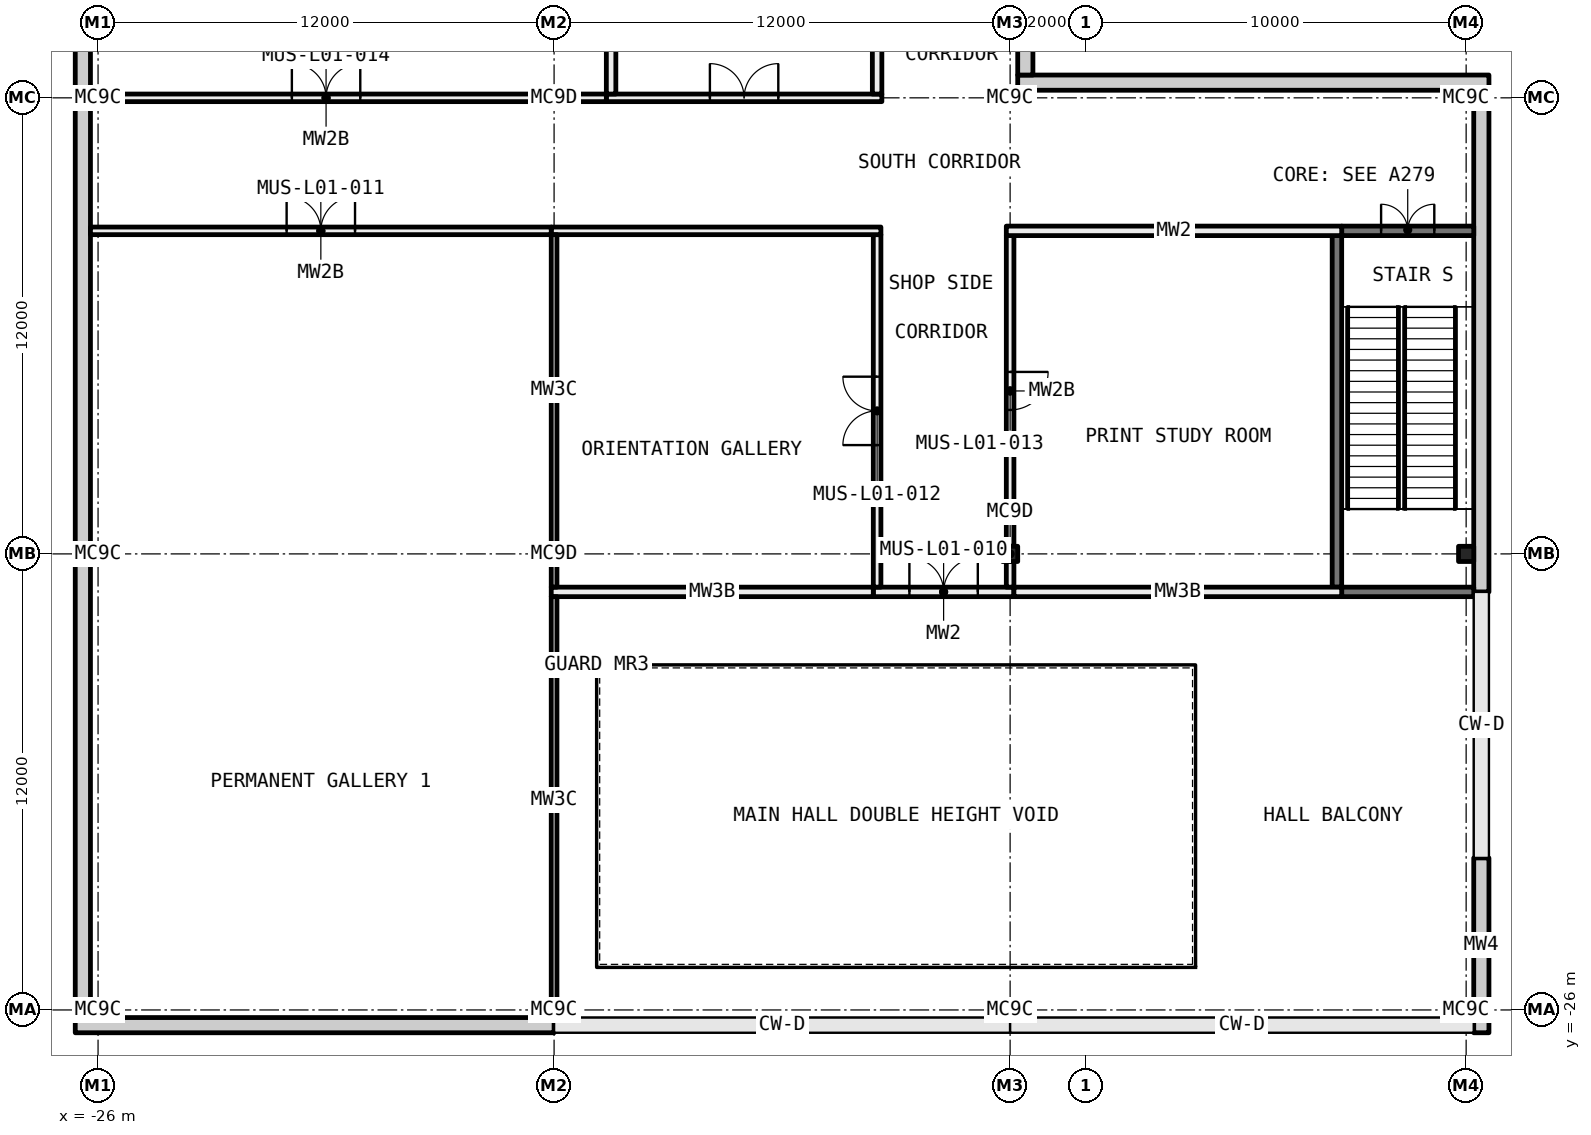
"""IFC4 building model, lengths in metres.
Left out: names, types, materials, properties, quantities, classifications, styles, units other than length and angle.
Written with IfcOpenShell. Run it as: python <this file> out.ifc"""

import sys

from ifc_helpers import new_model, si_unit, direction, frame, frame_2d, origin, origin_2d, place, context, subcontext, project, spatial, rectangle, i_section, extrude, element, fill, save


model = new_model("IFC4")
c1 = context("Model", 3, precision=1e-05, world=origin(), true_north=direction((0.0, 1.0)))
c2 = subcontext(c1, "Body", "Model", "MODEL_VIEW")
j1 = project(units=[si_unit("LENGTHUNIT", "METRE"), si_unit("PLANEANGLEUNIT", "RADIAN")], contexts=[c1])
p1 = place(None, origin())
s1 = spatial("IfcSite", under=j1, at=p1, CompositionType="ELEMENT")
p2 = place(p1, origin())
s2 = spatial("IfcBuilding", under=s1, at=p2, CompositionType="ELEMENT")
p3 = place(p2, frame((0.0, 0.0, 6.0)))
s3 = spatial("IfcBuildingStorey", under=s2, at=p3, CompositionType="ELEMENT", Elevation=6.0)
for number, where, z_axis, x_axis in (
    (1, (-26.0, -26.0, 0.0), (0.0, 0.0, 1.0), (1.0, 0.0, 0.0)),
    (2, (-26.0, -14.0, 0.0), (0.0, 0.0, 1.0), (1.0, 0.0, 0.0)),
    (3, (-26.0, -2.0, 0.0), (0.0, 0.0, 1.0), (1.0, 0.0, 0.0)),
    (4, (-14.0, -26.0, 0.0), (0.0, 0.0, 1.0), (1.0, 0.0, 0.0)),
    (5, (-14.0, -14.0, 0.0), (0.0, 0.0, 1.0), (1.0, 0.0, 0.0)),
    (6, (-14.0, -2.0, 0.0), (0.0, 0.0, 1.0), (1.0, 0.0, 0.0)),
    (7, (-2.0, -26.0, 0.0), (0.0, 0.0, 1.0), (1.0, 0.0, 0.0)),
    (8, (-2.0, -14.0, 0.0), (0.0, 0.0, 1.0), (1.0, 0.0, 0.0)),
    (9, (-2.0, -2.0, 0.0), (0.0, 0.0, 1.0), (1.0, 0.0, 0.0)),
    (10, (10.0, -26.0, 0.0), (0.0, 0.0, 1.0), (1.0, 0.0, 0.0)),
    (11, (10.0, -14.0, 0.0), (0.0, 0.0, 1.0), (1.0, 0.0, 0.0)),
    (12, (10.0, -2.0, 0.0), (0.0, 0.0, 1.0), (1.0, 0.0, 0.0)),
):
    element("IfcColumn", number, at=place(p3, frame(where, z_axis=z_axis, x_axis=x_axis)), inside=s3, PredefinedType="COLUMN", context=c2, shape_type="SweptSolid", body=[
        extrude(i_section(OverallWidth=0.4, OverallDepth=0.4, WebThickness=0.013, FlangeThickness=0.021, FilletRadius=0.022, at=origin_2d()), origin(), (0.0, 0.0, 1.0), 5.6),
    ])
p4 = place(p3, frame((-5.6, -15.0, 0.0), z_axis=(0.0, 0.0, 1.0), x_axis=(1.0, 0.0, 0.0)))
e13 = element("IfcWall", 13, at=p4, inside=s3, PredefinedType="PARTITIONING", context=c2, shape_type="SweptSolid", body=[
    extrude(rectangle(XDim=3.7, YDim=0.25, at=frame_2d((1.85, 0.0))), origin(), (0.0, 0.0, 1.0), 5.6),
])
p5 = place(p4, frame((0.95, 0.0, 0.0)))
e14 = element("IfcOpeningElement", 14, at=p5, cuts=e13, PredefinedType="OPENING", context=c2, shape_type="SweptSolid", body=[
    extrude(rectangle(XDim=1.8, YDim=2.1, at=frame_2d((0.9, 1.05))), frame((0.0, 0.135, 0.0), z_axis=(0.0, -1.0, 0.0), x_axis=(1.0, 0.0, 0.0)), (0.0, 0.0, 1.0), 0.27),
])
p6 = place(p3, frame((-12.625, -2.0, 0.0), z_axis=(0.0, 0.0, 1.0), x_axis=(1.0, 0.0, 0.0)))
e15 = element("IfcWall", 15, at=p6, inside=s3, PredefinedType="PARTITIONING", context=c2, shape_type="SweptSolid", body=[
    extrude(rectangle(XDim=7.25, YDim=0.2, at=frame_2d((3.625, 0.0))), origin(), (0.0, 0.0, 1.0), 5.012),
])
p7 = place(p6, frame((2.725, 0.0, 0.0)))
e16 = element("IfcOpeningElement", 16, at=p7, cuts=e15, PredefinedType="OPENING", context=c2, shape_type="SweptSolid", body=[
    extrude(rectangle(XDim=1.8, YDim=2.1, at=frame_2d((0.9, 1.05))), frame((0.0, 0.11, 0.0), z_axis=(0.0, -1.0, 0.0), x_axis=(1.0, 0.0, 0.0)), (0.0, 0.0, 1.0), 0.22),
])
p8 = place(p3, frame((-5.5, -1.9, 0.0), z_axis=(0.0, 0.0, 1.0), x_axis=(0.0, 1.0, 0.0)))
e17 = element("IfcWall", 17, at=p8, inside=s3, PredefinedType="PARTITIONING", context=c2, shape_type="SweptSolid", body=[
    extrude(rectangle(XDim=2.975, YDim=0.25, at=frame_2d((1.487, 0.0))), origin(), (0.0, 0.0, 1.0), 5.6),
])
p9 = place(p3, frame((-5.5, -14.875, 0.0), z_axis=(0.0, 0.0, 1.0), x_axis=(0.0, 1.0, 0.0)))
e18 = element("IfcWall", 18, at=p9, inside=s3, PredefinedType="PARTITIONING", context=c2, shape_type="SweptSolid", body=[
    extrude(rectangle(XDim=9.275, YDim=0.2, at=frame_2d((4.637, 0.0))), origin(), (0.0, 0.0, 1.0), 5.6),
])
p10 = place(p9, frame((3.738, 0.0, 0.0)))
e19 = element("IfcOpeningElement", 19, at=p10, cuts=e18, PredefinedType="OPENING", context=c2, shape_type="SweptSolid", body=[
    extrude(rectangle(XDim=1.8, YDim=2.1, at=frame_2d((0.9, 1.05))), frame((0.0, 0.11, 0.0), z_axis=(0.0, -1.0, 0.0), x_axis=(1.0, 0.0, 0.0)), (0.0, 0.0, 1.0), 0.22),
])
p11 = place(p3, frame((-14.075, -5.5, 0.0), z_axis=(0.0, 0.0, 1.0), x_axis=(1.0, 0.0, 0.0)))
e20 = element("IfcWall", 20, at=p11, inside=s3, PredefinedType="PARTITIONING", context=c2, shape_type="SweptSolid", body=[
    extrude(rectangle(XDim=8.675, YDim=0.2, at=frame_2d((4.337, 0.0))), origin(), (0.0, 0.0, 1.0), 5.6),
])
p12 = place(p3, frame((-26.2, -5.5, 0.0), z_axis=(0.0, 0.0, 1.0), x_axis=(1.0, 0.0, 0.0)))
e21 = element("IfcWall", 21, at=p12, inside=s3, PredefinedType="PARTITIONING", context=c2, shape_type="SweptSolid", body=[
    extrude(rectangle(XDim=12.125, YDim=0.2, at=frame_2d((6.062, 0.0))), origin(), (0.0, 0.0, 1.0), 5.6),
])
p13 = place(p12, frame((5.162, 0.0, 0.0)))
e22 = element("IfcOpeningElement", 22, at=p13, cuts=e21, PredefinedType="OPENING", context=c2, shape_type="SweptSolid", body=[
    extrude(rectangle(XDim=1.8, YDim=2.1, at=frame_2d((0.9, 1.05))), frame((0.0, 0.11, 0.0), z_axis=(0.0, -1.0, 0.0), x_axis=(1.0, 0.0, 0.0)), (0.0, 0.0, 1.0), 0.22),
])
p14 = place(p3, frame((-25.8, -2.0, 0.0), z_axis=(0.0, 0.0, 1.0), x_axis=(1.0, 0.0, 0.0)))
e23 = element("IfcWall", 23, at=p14, inside=s3, PredefinedType="PARTITIONING", context=c2, shape_type="SweptSolid", body=[
    extrude(rectangle(XDim=11.6, YDim=0.2, at=frame_2d((5.8, 0.0))), origin(), (0.0, 0.0, 1.0), 5.012),
])
p15 = place(p14, frame((4.9, 0.0, 0.0)))
e24 = element("IfcOpeningElement", 24, at=p15, cuts=e23, PredefinedType="OPENING", context=c2, shape_type="SweptSolid", body=[
    extrude(rectangle(XDim=1.8, YDim=2.1, at=frame_2d((0.9, 1.05))), frame((0.0, 0.11, 0.0), z_axis=(0.0, -1.0, 0.0), x_axis=(1.0, 0.0, 0.0)), (0.0, 0.0, 1.0), 0.22),
])
p16 = place(p3, frame((-13.8, -2.0, 0.0), z_axis=(0.0, 0.0, 1.0), x_axis=(1.0, 0.0, 0.0)))
e25 = element("IfcWall", 25, at=p16, inside=s3, PredefinedType="PARTITIONING", context=c2, shape_type="SweptSolid", body=[
    extrude(rectangle(XDim=1.175, YDim=0.2, at=frame_2d((0.587, 0.0))), origin(), (0.0, 0.0, 1.0), 5.012),
])
p17 = place(p3, frame((-2.0, -14.875, 0.0), z_axis=(0.0, 0.0, 1.0), x_axis=(0.0, 1.0, 0.0)))
e26 = element("IfcWall", 26, at=p17, inside=s3, PredefinedType="PARTITIONING", context=c2, shape_type="SweptSolid", body=[
    extrude(rectangle(XDim=0.675, YDim=0.2, at=frame_2d((0.337, 0.0))), origin(), (0.0, 0.0, 1.0), 5.012),
])
p18 = place(p3, frame((-2.0, -13.8, 0.0), z_axis=(0.0, 0.0, 1.0), x_axis=(0.0, 1.0, 0.0)))
e27 = element("IfcWall", 27, at=p18, inside=s3, PredefinedType="PARTITIONING", context=c2, shape_type="SweptSolid", body=[
    extrude(rectangle(XDim=8.175, YDim=0.2, at=frame_2d((4.087, 0.0))), origin(), (0.0, 0.0, 1.0), 5.012),
])
p19 = place(p18, frame((3.588, 0.0, 0.0)))
e28 = element("IfcOpeningElement", 28, at=p19, cuts=e27, PredefinedType="OPENING", context=c2, shape_type="SweptSolid", body=[
    extrude(rectangle(XDim=1.0, YDim=2.1, at=frame_2d((0.5, 1.05))), frame((0.0, 0.11, 0.0), z_axis=(0.0, -1.0, 0.0), x_axis=(1.0, 0.0, 0.0)), (0.0, 0.0, 1.0), 0.22),
])
p20 = place(p3, frame((-2.1, -5.5, 0.0), z_axis=(0.0, 0.0, 1.0), x_axis=(1.0, 0.0, 0.0)))
e29 = element("IfcWall", 29, at=p20, inside=s3, PredefinedType="PARTITIONING", context=c2, shape_type="SweptSolid", body=[
    extrude(rectangle(XDim=8.825, YDim=0.25, at=frame_2d((4.413, 0.0))), origin(), (0.0, 0.0, 1.0), 5.6),
])
p21 = place(p3, frame((6.725, -5.5, 0.0), z_axis=(0.0, 0.0, 1.0), x_axis=(1.0, 0.0, 0.0)))
e30 = element("IfcWall", 30, at=p21, inside=s3, PredefinedType="SHEAR", context=c2, shape_type="SweptSolid", body=[
    extrude(rectangle(XDim=3.475, YDim=0.25, at=frame_2d((1.737, 0.0))), origin(), (0.0, 0.0, 1.0), 5.6),
])
p22 = place(p21, frame((1.037, 0.0, 0.0)))
e31 = element("IfcOpeningElement", 31, at=p22, cuts=e30, PredefinedType="OPENING", context=c2, shape_type="SweptSolid", body=[
    extrude(rectangle(XDim=1.4, YDim=2.1, at=frame_2d((0.7, 1.05))), frame((0.0, 0.135, 0.0), z_axis=(0.0, -1.0, 0.0), x_axis=(1.0, 0.0, 0.0)), (0.0, 0.0, 1.0), 0.27),
])
p23 = place(p3, frame((-14.075, -15.0, 0.0), z_axis=(0.0, 0.0, 1.0), x_axis=(1.0, 0.0, 0.0)))
e32 = element("IfcWall", 32, at=p23, inside=s3, PredefinedType="PARTITIONING", context=c2, shape_type="SweptSolid", body=[
    extrude(rectangle(XDim=8.475, YDim=0.25, at=frame_2d((4.237, 0.0))), origin(), (0.0, 0.0, 1.0), 5.6),
])
p24 = place(p3, frame((-14.0, -25.8, 0.0), z_axis=(0.0, 0.0, 1.0), x_axis=(0.0, 1.0, 0.0)))
e33 = element("IfcWall", 33, at=p24, inside=s3, PredefinedType="PARTITIONING", context=c2, shape_type="SweptSolid", body=[
    extrude(rectangle(XDim=10.675, YDim=0.15, at=frame_2d((5.337, 0.0))), origin(), (0.0, 0.0, 1.0), 5.012),
])
p25 = place(p3, frame((-1.9, -15.0, 0.0), z_axis=(0.0, 0.0, 1.0), x_axis=(1.0, 0.0, 0.0)))
e34 = element("IfcWall", 34, at=p25, inside=s3, PredefinedType="PARTITIONING", context=c2, shape_type="SweptSolid", body=[
    extrude(rectangle(XDim=8.625, YDim=0.25, at=frame_2d((4.312, 0.0))), origin(), (0.0, 0.0, 1.0), 5.6),
])
p26 = place(p3, frame((-12.5, -1.9, 0.0), z_axis=(0.0, 0.0, 1.0), x_axis=(0.0, 1.0, 0.0)))
e35 = element("IfcWall", 35, at=p26, inside=s3, PredefinedType="PARTITIONING", context=c2, shape_type="SweptSolid", body=[
    extrude(rectangle(XDim=2.975, YDim=0.25, at=frame_2d((1.487, 0.0))), origin(), (0.0, 0.0, 1.0), 5.6),
])
p27 = place(p3, frame((-14.0, -14.875, 0.0), z_axis=(0.0, 0.0, 1.0), x_axis=(0.0, 1.0, 0.0)))
e36 = element("IfcWall", 36, at=p27, inside=s3, PredefinedType="PARTITIONING", context=c2, shape_type="SweptSolid", body=[
    extrude(rectangle(XDim=0.675, YDim=0.15, at=frame_2d((0.337, 0.0))), origin(), (0.0, 0.0, 1.0), 5.012),
])
p28 = place(p3, frame((-14.0, -13.8, 0.0), z_axis=(0.0, 0.0, 1.0), x_axis=(0.0, 1.0, 0.0)))
e37 = element("IfcWall", 37, at=p28, inside=s3, PredefinedType="PARTITIONING", context=c2, shape_type="SweptSolid", body=[
    extrude(rectangle(XDim=8.2, YDim=0.15, at=frame_2d((4.1, 0.0))), origin(), (0.0, 0.0, 1.0), 5.012),
])
p29 = place(p3, frame((6.725, -15.0, 0.0), z_axis=(0.0, 0.0, 1.0), x_axis=(1.0, 0.0, 0.0)))
e38 = element("IfcWall", 38, at=p29, inside=s3, PredefinedType="SHEAR", context=c2, shape_type="SweptSolid", body=[
    extrude(rectangle(XDim=3.475, YDim=0.25, at=frame_2d((1.737, 0.0))), origin(), (0.0, 0.0, 1.0), 5.6),
])
p30 = place(p3, frame((6.6, -14.875, 0.0), z_axis=(0.0, 0.0, 1.0), x_axis=(0.0, 1.0, 0.0)))
e39 = element("IfcWall", 39, at=p30, inside=s3, PredefinedType="SHEAR", context=c2, shape_type="SweptSolid", body=[
    extrude(rectangle(XDim=9.25, YDim=0.25, at=frame_2d((4.625, 0.0))), origin(), (0.0, 0.0, 1.0), 5.6),
])
p31 = place(p3, frame((-26.6, -26.4, -0.4), z_axis=(0.0, 0.0, 1.0), x_axis=(1.0, 0.0, 0.0)))
e40 = element("IfcWall", 40, at=p31, inside=s3, PredefinedType="STANDARD", context=c2, shape_type="SweptSolid", body=[
    extrude(rectangle(XDim=12.6, YDim=0.4, at=frame_2d((6.3, 0.0))), origin(), (0.0, 0.0, 1.0), 6.0),
])
p32 = place(p3, frame((10.4, -26.6, -0.4), z_axis=(0.0, 0.0, 1.0), x_axis=(0.0, 1.0, 0.0)))
e41 = element("IfcWall", 41, at=p32, inside=s3, PredefinedType="STANDARD", context=c2, shape_type="SweptSolid", body=[
    extrude(rectangle(XDim=4.6, YDim=0.4, at=frame_2d((2.3, 0.0))), origin(), (0.0, 0.0, 1.0), 6.0),
])
p33 = place(p3, frame((-26.4, -26.2, -0.4), z_axis=(0.0, 0.0, 1.0), x_axis=(0.0, 1.0, 0.0)))
e42 = element("IfcWall", 42, at=p33, inside=s3, PredefinedType="STANDARD", context=c2, shape_type="SweptSolid", body=[
    extrude(rectangle(XDim=72.4, YDim=0.4, at=frame_2d((36.2, 0.0))), origin(), (0.0, 0.0, 1.0), 6.0),
])
p34 = place(p3, frame((10.4, -15.0, -0.4), z_axis=(0.0, 0.0, 1.0), x_axis=(0.0, 1.0, 0.0)))
e43 = element("IfcWall", 43, at=p34, inside=s3, PredefinedType="STANDARD", context=c2, shape_type="SweptSolid", body=[
    extrude(rectangle(XDim=13.2, YDim=0.4, at=frame_2d((6.6, 0.0))), origin(), (0.0, 0.0, 1.0), 6.0),
])
p35 = place(p3, frame((-1.8, -1.6, -0.4), z_axis=(0.0, 0.0, 1.0), x_axis=(1.0, 0.0, 0.0)))
e44 = element("IfcWall", 44, at=p35, inside=s3, PredefinedType="STANDARD", context=c2, shape_type="SweptSolid", body=[
    extrude(rectangle(XDim=12.4, YDim=0.4, at=frame_2d((6.2, 0.0))), origin(), (0.0, 0.0, 1.0), 6.0),
])
p36 = place(p3, frame((-1.6, -1.4, -0.4), z_axis=(0.0, 0.0, 1.0), x_axis=(0.0, 1.0, 0.0)))
e45 = element("IfcWall", 45, at=p36, inside=s3, PredefinedType="STANDARD", context=c2, shape_type="SweptSolid", body=[
    extrude(rectangle(XDim=47.6, YDim=0.4, at=frame_2d((23.8, 0.0))), origin(), (0.0, 0.0, 1.0), 6.0),
])
p37 = place(p22, origin())
e46 = element("IfcDoor", 46, at=p37, inside=s3, OperationType="DOUBLE_DOOR_SINGLE_SWING", PredefinedType="DOOR", context=c2, shape_type="SweptSolid", body=[
    extrude(rectangle(XDim=1.4, YDim=2.1, at=frame_2d((0.7, 1.05))), frame((0.0, 0.025, 0.0), z_axis=(0.0, -1.0, 0.0), x_axis=(1.0, 0.0, 0.0)), (0.0, 0.0, 1.0), 0.05),
])
fill(e31, e46)
p38 = place(p7, origin())
e47 = element("IfcDoor", 47, at=p38, inside=s3, OperationType="DOUBLE_DOOR_SINGLE_SWING", PredefinedType="DOOR", context=c2, shape_type="SweptSolid", body=[
    extrude(rectangle(XDim=1.8, YDim=2.1, at=frame_2d((0.9, 1.05))), frame((0.0, 0.025, 0.0), z_axis=(0.0, -1.0, 0.0), x_axis=(1.0, 0.0, 0.0)), (0.0, 0.0, 1.0), 0.05),
])
fill(e16, e47)
p39 = place(p5, origin())
e48 = element("IfcDoor", 48, at=p39, inside=s3, OperationType="DOUBLE_DOOR_SINGLE_SWING", PredefinedType="DOOR", context=c2, shape_type="SweptSolid", body=[
    extrude(rectangle(XDim=1.8, YDim=2.1, at=frame_2d((0.9, 1.05))), frame((0.0, 0.025, 0.0), z_axis=(0.0, -1.0, 0.0), x_axis=(1.0, 0.0, 0.0)), (0.0, 0.0, 1.0), 0.05),
])
fill(e14, e48)
p40 = place(p13, origin())
e49 = element("IfcDoor", 49, at=p40, inside=s3, OperationType="DOUBLE_DOOR_SINGLE_SWING", PredefinedType="DOOR", context=c2, shape_type="SweptSolid", body=[
    extrude(rectangle(XDim=1.8, YDim=2.1, at=frame_2d((0.9, 1.05))), frame((0.0, 0.025, 0.0), z_axis=(0.0, -1.0, 0.0), x_axis=(1.0, 0.0, 0.0)), (0.0, 0.0, 1.0), 0.05),
])
fill(e22, e49)
p41 = place(p10, origin())
e50 = element("IfcDoor", 50, at=p41, inside=s3, OperationType="DOUBLE_DOOR_SINGLE_SWING", PredefinedType="DOOR", context=c2, shape_type="SweptSolid", body=[
    extrude(rectangle(XDim=1.8, YDim=2.1, at=frame_2d((0.9, 1.05))), frame((0.0, 0.025, 0.0), z_axis=(0.0, -1.0, 0.0), x_axis=(1.0, 0.0, 0.0)), (0.0, 0.0, 1.0), 0.05),
])
fill(e19, e50)
p42 = place(p19, frame((1.0, 0.0, 0.0), x_axis=(-1.0, 0.0, 0.0)))
e51 = element("IfcDoor", 51, at=p42, inside=s3, OperationType="SINGLE_SWING_RIGHT", PredefinedType="DOOR", context=c2, shape_type="SweptSolid", body=[
    extrude(rectangle(XDim=1.0, YDim=2.1, at=frame_2d((0.5, 1.05))), frame((0.0, 0.025, 0.0), z_axis=(0.0, -1.0, 0.0), x_axis=(1.0, 0.0, 0.0)), (0.0, 0.0, 1.0), 0.05),
])
fill(e28, e51)
p43 = place(p15, origin())
e52 = element("IfcDoor", 52, at=p43, inside=s3, OperationType="DOUBLE_DOOR_SINGLE_SWING", PredefinedType="DOOR", context=c2, shape_type="SweptSolid", body=[
    extrude(rectangle(XDim=1.8, YDim=2.1, at=frame_2d((0.9, 1.05))), frame((0.0, 0.025, 0.0), z_axis=(0.0, -1.0, 0.0), x_axis=(1.0, 0.0, 0.0)), (0.0, 0.0, 1.0), 0.05),
])
fill(e24, e52)
save(model, sys.argv[1])
